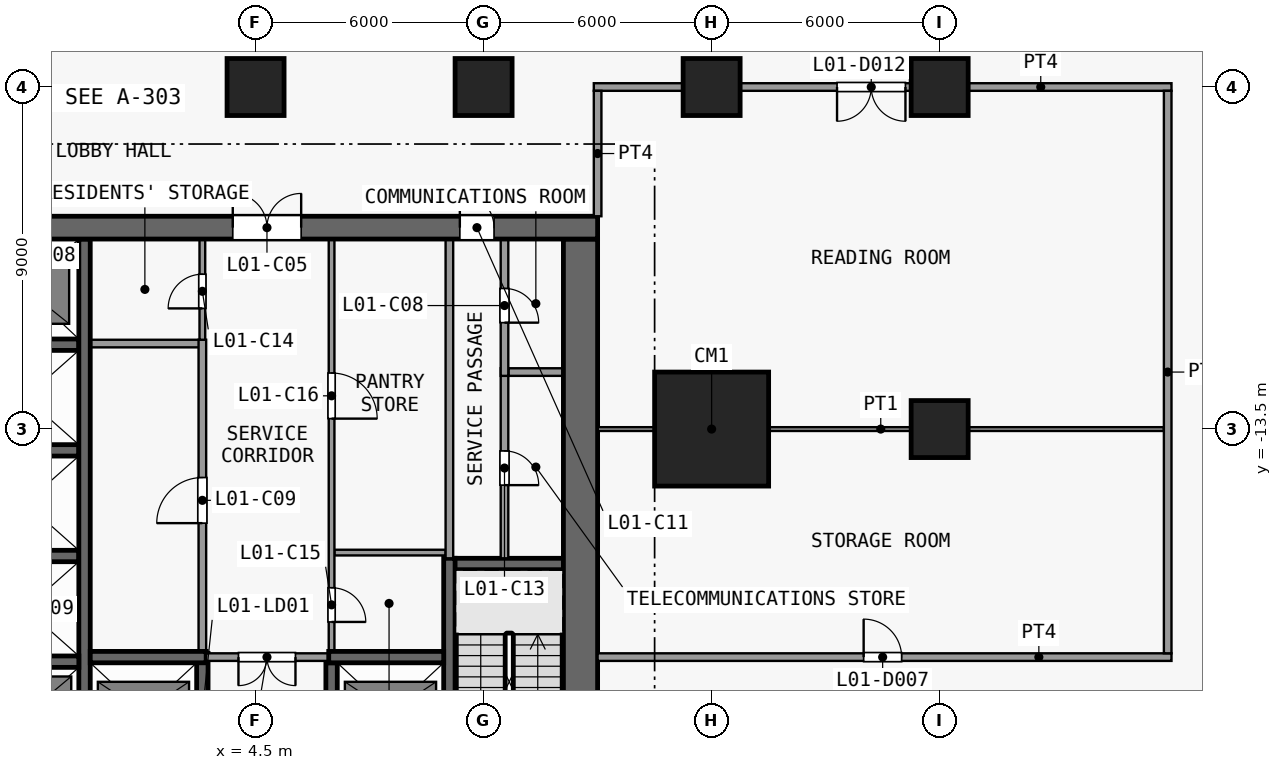
"""IFC4 building model, lengths in metres.
Left out: names, types, materials, properties, quantities, classifications, styles, units other than length and angle.
Written with IfcOpenShell. Run it as: python <this file> out.ifc"""

import sys

from ifc_helpers import new_model, si_unit, direction, frame, frame_2d, origin, origin_2d, place, context, subcontext, project, spatial, rectangle, extrude, element, fill, save


model = new_model("IFC4")
c1 = context("Model", 3, precision=1e-05, world=origin(), true_north=direction((0.0, 1.0)))
c2 = subcontext(c1, "Body", "Model", "MODEL_VIEW")
j1 = project(units=[si_unit("LENGTHUNIT", "METRE"), si_unit("PLANEANGLEUNIT", "RADIAN")], contexts=[c1])
p1 = place(None, origin())
s1 = spatial("IfcSite", under=j1, at=p1, CompositionType="ELEMENT")
p2 = place(p1, origin())
s2 = spatial("IfcBuilding", under=s1, at=p2, CompositionType="ELEMENT")
p3 = place(p2, frame((0.0, 0.0, 8.0)))
s3 = spatial("IfcBuildingStorey", under=s2, at=p3, CompositionType="ELEMENT", Elevation=8.0)
for number, where, z_axis, x_axis in (
    (1, (4.5, -4.5, 0.0), (0.0, 0.0, 1.0), (1.0, 0.0, 0.0)),
    (2, (10.5, -4.5, 0.0), (0.0, 0.0, 1.0), (1.0, 0.0, 0.0)),
):
    element("IfcColumn", number, at=place(p3, frame(where, z_axis=z_axis, x_axis=x_axis)), inside=s3, PredefinedType="COLUMN", context=c2, shape_type="SweptSolid", body=[
        extrude(rectangle(XDim=1.5, YDim=1.5, at=origin_2d()), origin(), (0.0, 0.0, 1.0), 5.5),
    ])
p4 = place(p3, frame((16.5, -13.5, 0.0), z_axis=(0.0, 0.0, 1.0), x_axis=(1.0, 0.0, 0.0)))
e3 = element("IfcColumn", 3, at=p4, inside=s3, PredefinedType="COLUMN", context=c2, shape_type="SweptSolid", body=[
    extrude(rectangle(XDim=3.0, YDim=3.0, at=origin_2d()), origin(), (0.0, 0.0, 1.0), 5.5),
])
for number, where, z_axis, x_axis in (
    (4, (16.5, -4.5, 0.0), (0.0, 0.0, 1.0), (1.0, 0.0, 0.0)),
    (5, (22.5, -13.5, 0.0), (0.0, 0.0, 1.0), (1.0, 0.0, 0.0)),
    (6, (22.5, -4.5, 0.0), (0.0, 0.0, 1.0), (1.0, 0.0, 0.0)),
):
    element("IfcColumn", number, at=place(p3, frame(where, z_axis=z_axis, x_axis=x_axis)), inside=s3, PredefinedType="COLUMN", context=c2, shape_type="SweptSolid", body=[
        extrude(rectangle(XDim=1.5, YDim=1.5, at=origin_2d()), origin(), (0.0, 0.0, 1.0), 5.5),
    ])
p5 = place(p3, frame((-13.5, -8.2, 0.0), z_axis=(0.0, 0.0, 1.0), x_axis=(1.0, 0.0, 0.0)))
e7 = element("IfcWall", 7, at=p5, inside=s3, PredefinedType="SHEAR", context=c2, shape_type="SweptSolid", body=[
    extrude(rectangle(XDim=27.0, YDim=0.6, at=frame_2d((13.5, 0.0))), origin(), (0.0, 0.0, 1.0), 5.15),
])
p6 = place(p5, frame((7.8, 0.0, 0.0)))
e8 = element("IfcOpeningElement", 8, at=p6, cuts=e7, PredefinedType="OPENING", context=c2, shape_type="SweptSolid", body=[
    extrude(rectangle(XDim=1.8, YDim=2.1, at=frame_2d((0.9, 1.05))), frame((0.0, 0.31, 0.0), z_axis=(0.0, -1.0, 0.0), x_axis=(1.0, 0.0, 0.0)), (0.0, 0.0, 1.0), 0.62),
])
p7 = place(p5, frame((17.4, 0.0, 0.0)))
e9 = element("IfcOpeningElement", 9, at=p7, cuts=e7, PredefinedType="OPENING", context=c2, shape_type="SweptSolid", body=[
    extrude(rectangle(XDim=1.8, YDim=2.1, at=frame_2d((0.9, 1.05))), frame((0.0, 0.31, 0.0), z_axis=(0.0, -1.0, 0.0), x_axis=(1.0, 0.0, 0.0)), (0.0, 0.0, 1.0), 0.62),
])
p8 = place(p5, frame((2.725, 0.0, 0.0)))
e10 = element("IfcOpeningElement", 10, at=p8, cuts=e7, PredefinedType="OPENING", context=c2, shape_type="SweptSolid", body=[
    extrude(rectangle(XDim=0.9, YDim=2.1, at=frame_2d((0.45, 1.05))), frame((0.0, 0.31, 0.0), z_axis=(0.0, -1.0, 0.0), x_axis=(1.0, 0.0, 0.0)), (0.0, 0.0, 1.0), 0.62),
])
p9 = place(p5, frame((23.375, 0.0, 0.0)))
e11 = element("IfcOpeningElement", 11, at=p9, cuts=e7, PredefinedType="OPENING", context=c2, shape_type="SweptSolid", body=[
    extrude(rectangle(XDim=0.9, YDim=2.1, at=frame_2d((0.45, 1.05))), frame((0.0, 0.31, 0.0), z_axis=(0.0, -1.0, 0.0), x_axis=(1.0, 0.0, 0.0)), (0.0, 0.0, 1.0), 0.62),
])
p10 = place(p3, frame((13.05, -24.6, 0.0), z_axis=(0.0, 0.0, 1.0), x_axis=(0.0, 1.0, 0.0)))
e12 = element("IfcWall", 12, at=p10, inside=s3, PredefinedType="SHEAR", context=c2, shape_type="SweptSolid", body=[
    extrude(rectangle(XDim=16.1, YDim=0.9, at=frame_2d((8.05, 0.0))), origin(), (0.0, 0.0, 1.0), 5.15),
])
p11 = place(p10, frame((0.2, 0.0, 0.0)))
e13 = element("IfcOpeningElement", 13, at=p11, cuts=e12, PredefinedType="OPENING", context=c2, shape_type="SweptSolid", body=[
    extrude(rectangle(XDim=1.1, YDim=2.1, at=frame_2d((0.55, 1.05))), frame((0.0, 0.46, 0.0), z_axis=(0.0, -1.0, 0.0), x_axis=(1.0, 0.0, 0.0)), (0.0, 0.0, 1.0), 0.92),
])
p12 = place(p3, frame((-2.95, -19.62, 0.0), z_axis=(0.0, 0.0, 1.0), x_axis=(1.0, 0.0, 0.0)))
e14 = element("IfcWall", 14, at=p12, inside=s3, PredefinedType="SHEAR", context=c2, shape_type="SweptSolid", body=[
    extrude(rectangle(XDim=2.8, YDim=0.3, at=frame_2d((1.4, 0.0))), origin(), (0.0, 0.0, 1.0), 5.15),
])
p13 = place(p3, frame((0.15, -19.5, 0.0), z_axis=(0.0, 0.0, 1.0), x_axis=(1.0, 0.0, 0.0)))
e15 = element("IfcWall", 15, at=p13, inside=s3, PredefinedType="SHEAR", context=c2, shape_type="SweptSolid", body=[
    extrude(rectangle(XDim=3.05, YDim=0.3, at=frame_2d((1.525, 0.0))), origin(), (0.0, 0.0, 1.0), 5.15),
])
p14 = place(p3, frame((6.575, -19.5, 0.0), z_axis=(0.0, 0.0, 1.0), x_axis=(-1.0, 0.0, 0.0)))
e16 = element("IfcWall", 16, at=p14, inside=s3, PredefinedType="PARTITIONING", context=c2, shape_type="SweptSolid", body=[
    extrude(rectangle(XDim=3.375, YDim=0.2, at=frame_2d((1.688, 0.0))), origin(), (0.0, 0.0, 1.0), 5.15),
])
p15 = place(p14, frame((1.025, 0.0, 0.0)))
e17 = element("IfcOpeningElement", 17, at=p15, cuts=e16, PredefinedType="OPENING", context=c2, shape_type="SweptSolid", body=[
    extrude(rectangle(XDim=1.5, YDim=2.1, at=frame_2d((0.75, 1.05))), frame((0.0, 0.11, 0.0), z_axis=(0.0, -1.0, 0.0), x_axis=(1.0, 0.0, 0.0)), (0.0, 0.0, 1.0), 0.22),
])
p16 = place(p3, frame((6.425, -19.5, 0.0), z_axis=(0.0, 0.0, 1.0), x_axis=(1.0, 0.0, 0.0)))
e18 = element("IfcWall", 18, at=p16, inside=s3, PredefinedType="SHEAR", context=c2, shape_type="SweptSolid", body=[
    extrude(rectangle(XDim=3.025, YDim=0.3, at=frame_2d((1.512, 0.0))), origin(), (0.0, 0.0, 1.0), 5.15),
])
p17 = place(p3, frame((9.5, -17.05, 0.0), z_axis=(0.0, 0.0, 1.0), x_axis=(1.0, 0.0, 0.0)))
e19 = element("IfcWall", 19, at=p17, inside=s3, PredefinedType="SHEAR", context=c2, shape_type="SweptSolid", body=[
    extrude(rectangle(XDim=3.1, YDim=0.3, at=frame_2d((1.55, 0.0))), origin(), (0.0, 0.0, 1.0), 5.15),
])
p18 = place(p3, frame((-2.95, -16.84, 0.0), z_axis=(0.0, 0.0, 1.0), x_axis=(1.0, 0.0, 0.0)))
e20 = element("IfcWall", 20, at=p18, inside=s3, PredefinedType="SHEAR", context=c2, shape_type="SweptSolid", body=[
    extrude(rectangle(XDim=2.8, YDim=0.3, at=frame_2d((1.4, 0.0))), origin(), (0.0, 0.0, 1.0), 5.15),
])
p19 = place(p3, frame((6.575, -16.75, 0.0), z_axis=(0.0, 0.0, 1.0), x_axis=(1.0, 0.0, 0.0)))
e21 = element("IfcWall", 21, at=p19, inside=s3, PredefinedType="PARTITIONING", context=c2, shape_type="SweptSolid", body=[
    extrude(rectangle(XDim=2.925, YDim=0.15, at=frame_2d((1.462, 0.0))), origin(), (0.0, 0.0, 1.0), 5.15),
])
p20 = place(p3, frame((-2.95, -14.06, 0.0), z_axis=(0.0, 0.0, 1.0), x_axis=(1.0, 0.0, 0.0)))
e22 = element("IfcWall", 22, at=p20, inside=s3, PredefinedType="SHEAR", context=c2, shape_type="SweptSolid", body=[
    extrude(rectangle(XDim=2.8, YDim=0.3, at=frame_2d((1.4, 0.0))), origin(), (0.0, 0.0, 1.0), 5.15),
])
p21 = place(p3, frame((11.15, -12.0, 0.0), z_axis=(0.0, 0.0, 1.0), x_axis=(1.0, 0.0, 0.0)))
e23 = element("IfcWall", 23, at=p21, inside=s3, PredefinedType="PARTITIONING", context=c2, shape_type="SweptSolid", body=[
    extrude(rectangle(XDim=1.45, YDim=0.2, at=frame_2d((0.725, 0.0))), origin(), (0.0, 0.0, 1.0), 5.15),
])
p22 = place(p3, frame((-2.95, -11.28, 0.0), z_axis=(0.0, 0.0, 1.0), x_axis=(1.0, 0.0, 0.0)))
e24 = element("IfcWall", 24, at=p22, inside=s3, PredefinedType="SHEAR", context=c2, shape_type="SweptSolid", body=[
    extrude(rectangle(XDim=2.8, YDim=0.3, at=frame_2d((1.4, 0.0))), origin(), (0.0, 0.0, 1.0), 5.15),
])
p23 = place(p3, frame((0.15, -11.25, 0.0), z_axis=(0.0, 0.0, 1.0), x_axis=(1.0, 0.0, 0.0)))
e25 = element("IfcWall", 25, at=p23, inside=s3, PredefinedType="PARTITIONING", context=c2, shape_type="SweptSolid", body=[
    extrude(rectangle(XDim=3.025, YDim=0.2, at=frame_2d((1.513, 0.0))), origin(), (0.0, 0.0, 1.0), 5.15),
])
p24 = place(p3, frame((0.0, -22.25, 0.0), z_axis=(0.0, 0.0, 1.0), x_axis=(0.0, 1.0, 0.0)))
e26 = element("IfcWall", 26, at=p24, inside=s3, PredefinedType="SHEAR", context=c2, shape_type="SweptSolid", body=[
    extrude(rectangle(XDim=13.75, YDim=0.3, at=frame_2d((6.875, 0.0))), origin(), (0.0, 0.0, 1.0), 5.15),
])
p25 = place(p3, frame((3.1, -22.25, 0.0), z_axis=(0.0, 0.0, 1.0), x_axis=(0.0, 1.0, 0.0)))
e27 = element("IfcWall", 27, at=p25, inside=s3, PredefinedType="SHEAR", context=c2, shape_type="SweptSolid", body=[
    extrude(rectangle(XDim=2.85, YDim=0.3, at=frame_2d((1.425, 0.0))), origin(), (0.0, 0.0, 1.0), 5.15),
])
p26 = place(p25, frame((0.75, 0.0, 0.0)))
e28 = element("IfcOpeningElement", 28, at=p26, cuts=e27, PredefinedType="OPENING", context=c2, shape_type="SweptSolid", body=[
    extrude(rectangle(XDim=1.1, YDim=2.1, at=frame_2d((0.55, 1.05))), frame((0.0, 0.16, 0.0), z_axis=(0.0, -1.0, 0.0), x_axis=(1.0, 0.0, 0.0)), (0.0, 0.0, 1.0), 0.32),
])
p27 = place(p3, frame((3.1, -19.6, 0.0), z_axis=(0.0, 0.0, 1.0), x_axis=(0.0, 1.0, 0.0)))
e29 = element("IfcWall", 29, at=p27, inside=s3, PredefinedType="PARTITIONING", context=c2, shape_type="SweptSolid", body=[
    extrude(rectangle(XDim=8.45, YDim=0.2, at=frame_2d((4.225, 0.0))), origin(), (0.0, 0.0, 1.0), 5.15),
])
p28 = place(p27, frame((3.625, 0.0, 0.0)))
e30 = element("IfcOpeningElement", 30, at=p28, cuts=e29, PredefinedType="OPENING", context=c2, shape_type="SweptSolid", body=[
    extrude(rectangle(XDim=1.2, YDim=2.1, at=frame_2d((0.6, 1.05))), frame((0.0, 0.11, 0.0), z_axis=(0.0, -1.0, 0.0), x_axis=(1.0, 0.0, 0.0)), (0.0, 0.0, 1.0), 0.22),
])
p29 = place(p3, frame((3.1, -11.15, 0.0), z_axis=(0.0, 0.0, 1.0), x_axis=(0.0, 1.0, 0.0)))
e31 = element("IfcWall", 31, at=p29, inside=s3, PredefinedType="PARTITIONING", context=c2, shape_type="SweptSolid", body=[
    extrude(rectangle(XDim=2.65, YDim=0.15, at=frame_2d((1.325, 0.0))), origin(), (0.0, 0.0, 1.0), 5.15),
])
p30 = place(p29, frame((0.825, 0.0, 0.0)))
e32 = element("IfcOpeningElement", 32, at=p30, cuts=e31, PredefinedType="OPENING", context=c2, shape_type="SweptSolid", body=[
    extrude(rectangle(XDim=0.9, YDim=2.1, at=frame_2d((0.45, 1.05))), frame((0.0, 0.085, 0.0), z_axis=(0.0, -1.0, 0.0), x_axis=(1.0, 0.0, 0.0)), (0.0, 0.0, 1.0), 0.17),
])
p31 = place(p3, frame((6.5, -22.25, 0.0), z_axis=(0.0, 0.0, 1.0), x_axis=(0.0, 1.0, 0.0)))
e33 = element("IfcWall", 33, at=p31, inside=s3, PredefinedType="SHEAR", context=c2, shape_type="SweptSolid", body=[
    extrude(rectangle(XDim=2.6, YDim=0.3, at=frame_2d((1.3, 0.0))), origin(), (0.0, 0.0, 1.0), 5.15),
])
p32 = place(p31, frame((0.75, 0.0, 0.0)))
e34 = element("IfcOpeningElement", 34, at=p32, cuts=e33, PredefinedType="OPENING", context=c2, shape_type="SweptSolid", body=[
    extrude(rectangle(XDim=1.1, YDim=2.1, at=frame_2d((0.55, 1.05))), frame((0.0, 0.16, 0.0), z_axis=(0.0, -1.0, 0.0), x_axis=(1.0, 0.0, 0.0)), (0.0, 0.0, 1.0), 0.32),
])
p33 = place(p3, frame((6.5, -8.5, 0.0), z_axis=(0.0, 0.0, 1.0), x_axis=(0.0, -1.0, 0.0)))
e35 = element("IfcWall", 35, at=p33, inside=s3, PredefinedType="PARTITIONING", context=c2, shape_type="SweptSolid", body=[
    extrude(rectangle(XDim=10.85, YDim=0.15, at=frame_2d((5.425, 0.0))), origin(), (0.0, 0.0, 1.0), 5.15),
])
p34 = place(p33, frame((9.175, 0.0, 0.0)))
e36 = element("IfcOpeningElement", 36, at=p34, cuts=e35, PredefinedType="OPENING", context=c2, shape_type="SweptSolid", body=[
    extrude(rectangle(XDim=0.9, YDim=2.1, at=frame_2d((0.45, 1.05))), frame((0.0, 0.085, 0.0), z_axis=(0.0, -1.0, 0.0), x_axis=(1.0, 0.0, 0.0)), (0.0, 0.0, 1.0), 0.17),
])
p35 = place(p33, frame((3.525, 0.0, 0.0)))
e37 = element("IfcOpeningElement", 37, at=p35, cuts=e35, PredefinedType="OPENING", context=c2, shape_type="SweptSolid", body=[
    extrude(rectangle(XDim=1.2, YDim=2.1, at=frame_2d((0.6, 1.05))), frame((0.0, 0.085, 0.0), z_axis=(0.0, -1.0, 0.0), x_axis=(1.0, 0.0, 0.0)), (0.0, 0.0, 1.0), 0.17),
])
p36 = place(p3, frame((9.6, -16.9, 0.0), z_axis=(0.0, 0.0, 1.0), x_axis=(0.0, -1.0, 0.0)))
e38 = element("IfcWall", 38, at=p36, inside=s3, PredefinedType="SHEAR", context=c2, shape_type="SweptSolid", body=[
    extrude(rectangle(XDim=7.7, YDim=0.3, at=frame_2d((3.85, 0.0))), origin(), (0.0, 0.0, 1.0), 5.15),
])
p37 = place(p36, frame((6.5, 0.0, 0.0)))
e39 = element("IfcOpeningElement", 39, at=p37, cuts=e38, PredefinedType="OPENING", context=c2, shape_type="SweptSolid", body=[
    extrude(rectangle(XDim=1.1, YDim=2.1, at=frame_2d((0.55, 1.05))), frame((0.0, 0.16, 0.0), z_axis=(0.0, -1.0, 0.0), x_axis=(1.0, 0.0, 0.0)), (0.0, 0.0, 1.0), 0.32),
])
p38 = place(p3, frame((9.6, -16.9, 0.0), z_axis=(0.0, 0.0, 1.0), x_axis=(0.0, 1.0, 0.0)))
e40 = element("IfcWall", 40, at=p38, inside=s3, PredefinedType="PARTITIONING", context=c2, shape_type="SweptSolid", body=[
    extrude(rectangle(XDim=8.4, YDim=0.2, at=frame_2d((4.2, 0.0))), origin(), (0.0, 0.0, 1.0), 5.15),
])
p39 = place(p3, frame((11.05, -11.9, 0.0), z_axis=(0.0, 0.0, 1.0), x_axis=(0.0, -1.0, 0.0)))
e41 = element("IfcWall", 41, at=p39, inside=s3, PredefinedType="PARTITIONING", context=c2, shape_type="SweptSolid", body=[
    extrude(rectangle(XDim=5.0, YDim=0.2, at=frame_2d((2.5, 0.0))), origin(), (0.0, 0.0, 1.0), 5.15),
])
p40 = place(p39, frame((2.175, 0.0, 0.0)))
e42 = element("IfcOpeningElement", 42, at=p40, cuts=e41, PredefinedType="OPENING", context=c2, shape_type="SweptSolid", body=[
    extrude(rectangle(XDim=0.9, YDim=2.1, at=frame_2d((0.45, 1.05))), frame((0.0, 0.11, 0.0), z_axis=(0.0, -1.0, 0.0), x_axis=(1.0, 0.0, 0.0)), (0.0, 0.0, 1.0), 0.22),
])
p41 = place(p3, frame((11.05, -8.5, 0.0), z_axis=(0.0, 0.0, 1.0), x_axis=(0.0, -1.0, 0.0)))
e43 = element("IfcWall", 43, at=p41, inside=s3, PredefinedType="PARTITIONING", context=c2, shape_type="SweptSolid", body=[
    extrude(rectangle(XDim=3.6, YDim=0.2, at=frame_2d((1.8, 0.0))), origin(), (0.0, 0.0, 1.0), 5.15),
])
p42 = place(p41, frame((1.3, 0.0, 0.0)))
e44 = element("IfcOpeningElement", 44, at=p42, cuts=e43, PredefinedType="OPENING", context=c2, shape_type="SweptSolid", body=[
    extrude(rectangle(XDim=0.9, YDim=2.1, at=frame_2d((0.45, 1.05))), frame((0.0, 0.11, 0.0), z_axis=(0.0, -1.0, 0.0), x_axis=(1.0, 0.0, 0.0)), (0.0, 0.0, 1.0), 0.22),
])
p43 = place(p3, frame((13.5, -19.5, 0.0), z_axis=(0.0, 0.0, 1.0), x_axis=(1.0, 0.0, 0.0)))
e45 = element("IfcWall", 45, at=p43, inside=s3, PredefinedType="PARTITIONING", context=c2, shape_type="SweptSolid", body=[
    extrude(rectangle(XDim=15.1, YDim=0.2, at=frame_2d((7.55, 0.0))), origin(), (0.0, 0.0, 1.0), 5.15),
])
p44 = place(p43, frame((7.0, 0.0, 0.0)))
e46 = element("IfcOpeningElement", 46, at=p44, cuts=e45, PredefinedType="OPENING", context=c2, shape_type="SweptSolid", body=[
    extrude(rectangle(XDim=1.0, YDim=2.1, at=frame_2d((0.5, 1.05))), frame((0.0, 0.11, 0.0), z_axis=(0.0, -1.0, 0.0), x_axis=(1.0, 0.0, 0.0)), (0.0, 0.0, 1.0), 0.22),
])
p45 = place(p3, frame((13.5, -13.5, 0.0), z_axis=(0.0, 0.0, 1.0), x_axis=(1.0, 0.0, 0.0)))
e47 = element("IfcWall", 47, at=p45, inside=s3, PredefinedType="PARTITIONING", context=c2, shape_type="SweptSolid", body=[
    extrude(rectangle(XDim=14.9, YDim=0.1, at=frame_2d((7.45, 0.0))), origin(), (0.0, 0.0, 1.0), 5.15),
])
p46 = place(p3, frame((13.4, -4.5, 0.0), z_axis=(0.0, 0.0, 1.0), x_axis=(1.0, 0.0, 0.0)))
e48 = element("IfcWall", 48, at=p46, inside=s3, PredefinedType="PARTITIONING", context=c2, shape_type="SweptSolid", body=[
    extrude(rectangle(XDim=15.2, YDim=0.2, at=frame_2d((7.6, 0.0))), origin(), (0.0, 0.0, 1.0), 5.15),
])
p47 = place(p46, frame((6.4, 0.0, 0.0)))
e49 = element("IfcOpeningElement", 49, at=p47, cuts=e48, PredefinedType="OPENING", context=c2, shape_type="SweptSolid", body=[
    extrude(rectangle(XDim=1.8, YDim=2.1, at=frame_2d((0.9, 1.05))), frame((0.0, 0.11, 0.0), z_axis=(0.0, -1.0, 0.0), x_axis=(1.0, 0.0, 0.0)), (0.0, 0.0, 1.0), 0.22),
])
p48 = place(p3, frame((13.5, -7.9, 0.0), z_axis=(0.0, 0.0, 1.0), x_axis=(0.0, 1.0, 0.0)))
e50 = element("IfcWall", 50, at=p48, inside=s3, PredefinedType="PARTITIONING", context=c2, shape_type="SweptSolid", body=[
    extrude(rectangle(XDim=3.3, YDim=0.2, at=frame_2d((1.65, 0.0))), origin(), (0.0, 0.0, 1.0), 5.15),
])
p49 = place(p3, frame((28.5, -19.4, 0.0), z_axis=(0.0, 0.0, 1.0), x_axis=(0.0, 1.0, 0.0)))
e51 = element("IfcWall", 51, at=p49, inside=s3, PredefinedType="PARTITIONING", context=c2, shape_type="SweptSolid", body=[
    extrude(rectangle(XDim=14.8, YDim=0.2, at=frame_2d((7.4, 0.0))), origin(), (0.0, 0.0, 1.0), 5.15),
])
p50 = place(p15, origin())
e52 = element("IfcDoor", 52, at=p50, inside=s3, OperationType="DOUBLE_DOOR_SINGLE_SWING", PredefinedType="DOOR", context=c2, shape_type="SweptSolid", body=[
    extrude(rectangle(XDim=1.5, YDim=2.1, at=frame_2d((0.75, 1.05))), frame((0.0, 0.025, 0.0), z_axis=(0.0, -1.0, 0.0), x_axis=(1.0, 0.0, 0.0)), (0.0, 0.0, 1.0), 0.05),
])
fill(e17, e52)
p51 = place(p7, origin())
e53 = element("IfcDoor", 53, at=p51, inside=s3, OperationType="DOUBLE_DOOR_SINGLE_SWING", PredefinedType="DOOR", context=c2, shape_type="SweptSolid", body=[
    extrude(rectangle(XDim=1.8, YDim=2.1, at=frame_2d((0.9, 1.05))), frame((0.0, 0.025, 0.0), z_axis=(0.0, -1.0, 0.0), x_axis=(1.0, 0.0, 0.0)), (0.0, 0.0, 1.0), 0.05),
])
fill(e9, e53)
p52 = place(p42, origin())
e54 = element("IfcDoor", 54, at=p52, inside=s3, OperationType="SINGLE_SWING_RIGHT", PredefinedType="DOOR", context=c2, shape_type="SweptSolid", body=[
    extrude(rectangle(XDim=0.9, YDim=2.1, at=frame_2d((0.45, 1.05))), frame((0.0, 0.025, 0.0), z_axis=(0.0, -1.0, 0.0), x_axis=(1.0, 0.0, 0.0)), (0.0, 0.0, 1.0), 0.05),
])
fill(e44, e54)
p53 = place(p28, origin())
e55 = element("IfcDoor", 55, at=p53, inside=s3, OperationType="SINGLE_SWING_LEFT", PredefinedType="DOOR", context=c2, shape_type="SweptSolid", body=[
    extrude(rectangle(XDim=1.2, YDim=2.1, at=frame_2d((0.6, 1.05))), frame((0.0, 0.025, 0.0), z_axis=(0.0, -1.0, 0.0), x_axis=(1.0, 0.0, 0.0)), (0.0, 0.0, 1.0), 0.05),
])
fill(e30, e55)
p54 = place(p9, origin())
e56 = element("IfcDoor", 56, at=p54, inside=s3, OperationType="SINGLE_SWING_LEFT", PredefinedType="DOOR", context=c2, shape_type="SweptSolid", body=[
    extrude(rectangle(XDim=0.9, YDim=2.1, at=frame_2d((0.45, 1.05))), frame((0.0, 0.025, 0.0), z_axis=(0.0, -1.0, 0.0), x_axis=(1.0, 0.0, 0.0)), (0.0, 0.0, 1.0), 0.05),
])
fill(e11, e56)
p55 = place(p40, origin())
e57 = element("IfcDoor", 57, at=p55, inside=s3, OperationType="SINGLE_SWING_RIGHT", PredefinedType="DOOR", context=c2, shape_type="SweptSolid", body=[
    extrude(rectangle(XDim=0.9, YDim=2.1, at=frame_2d((0.45, 1.05))), frame((0.0, 0.025, 0.0), z_axis=(0.0, -1.0, 0.0), x_axis=(1.0, 0.0, 0.0)), (0.0, 0.0, 1.0), 0.05),
])
fill(e42, e57)
p56 = place(p30, origin())
e58 = element("IfcDoor", 58, at=p56, inside=s3, OperationType="SINGLE_SWING_LEFT", PredefinedType="DOOR", context=c2, shape_type="SweptSolid", body=[
    extrude(rectangle(XDim=0.9, YDim=2.1, at=frame_2d((0.45, 1.05))), frame((0.0, 0.025, 0.0), z_axis=(0.0, -1.0, 0.0), x_axis=(1.0, 0.0, 0.0)), (0.0, 0.0, 1.0), 0.05),
])
fill(e32, e58)
p57 = place(p34, origin())
e59 = element("IfcDoor", 59, at=p57, inside=s3, OperationType="SINGLE_SWING_RIGHT", PredefinedType="DOOR", context=c2, shape_type="SweptSolid", body=[
    extrude(rectangle(XDim=0.9, YDim=2.1, at=frame_2d((0.45, 1.05))), frame((0.0, 0.025, 0.0), z_axis=(0.0, -1.0, 0.0), x_axis=(1.0, 0.0, 0.0)), (0.0, 0.0, 1.0), 0.05),
])
fill(e36, e59)
p58 = place(p35, origin())
e60 = element("IfcDoor", 60, at=p58, inside=s3, OperationType="SINGLE_SWING_RIGHT", PredefinedType="DOOR", context=c2, shape_type="SweptSolid", body=[
    extrude(rectangle(XDim=1.2, YDim=2.1, at=frame_2d((0.6, 1.05))), frame((0.0, 0.025, 0.0), z_axis=(0.0, -1.0, 0.0), x_axis=(1.0, 0.0, 0.0)), (0.0, 0.0, 1.0), 0.05),
])
fill(e37, e60)
p59 = place(p44, origin())
e61 = element("IfcDoor", 61, at=p59, inside=s3, OperationType="SINGLE_SWING_RIGHT", PredefinedType="DOOR", context=c2, shape_type="SweptSolid", body=[
    extrude(rectangle(XDim=1.0, YDim=2.1, at=frame_2d((0.5, 1.05))), frame((0.0, 0.025, 0.0), z_axis=(0.0, -1.0, 0.0), x_axis=(1.0, 0.0, 0.0)), (0.0, 0.0, 1.0), 0.05),
])
fill(e46, e61)
p60 = place(p47, origin())
e62 = element("IfcDoor", 62, at=p60, inside=s3, OperationType="DOUBLE_DOOR_SINGLE_SWING", PredefinedType="DOOR", context=c2, shape_type="SweptSolid", body=[
    extrude(rectangle(XDim=1.8, YDim=2.1, at=frame_2d((0.9, 1.05))), frame((0.0, 0.025, 0.0), z_axis=(0.0, -1.0, 0.0), x_axis=(1.0, 0.0, 0.0)), (0.0, 0.0, 1.0), 0.05),
])
fill(e49, e62)
save(model, sys.argv[1])
